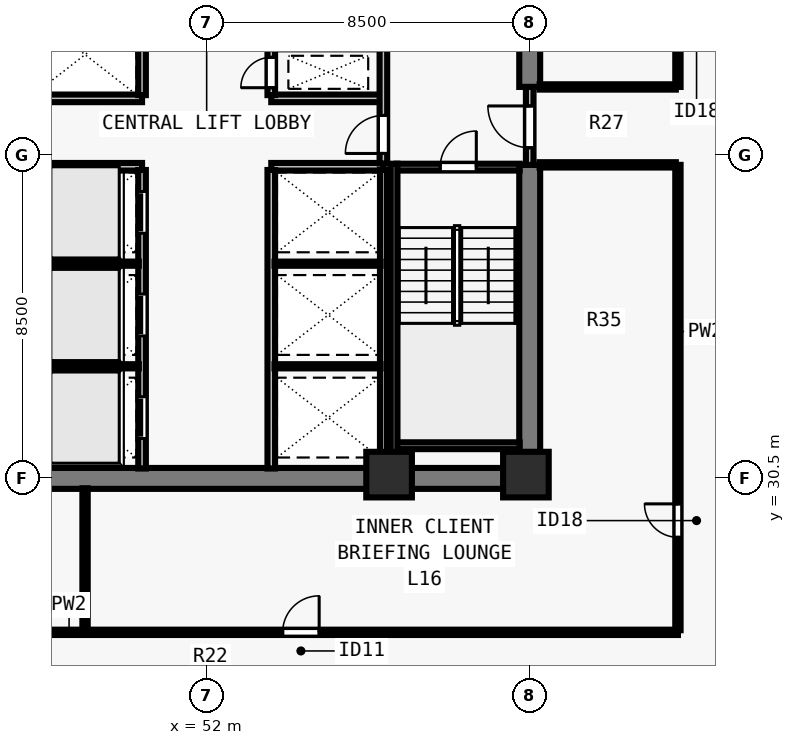
"""IFC4 building model, lengths in metres.
Left out: names, types, materials, properties, quantities, classifications, styles, units other than length and angle.
Written with IfcOpenShell. Run it as: python <this file> out.ifc"""

import sys

from ifc_helpers import new_model, si_unit, direction, frame, frame_2d, origin, origin_2d, place, context, subcontext, project, spatial, rectangle, extrude, element, fill, save


model = new_model("IFC4")
c1 = context("Model", 3, precision=1e-05, world=origin(), true_north=direction((0.0, 1.0)))
c2 = subcontext(c1, "Body", "Model", "MODEL_VIEW")
j1 = project(units=[si_unit("LENGTHUNIT", "METRE"), si_unit("PLANEANGLEUNIT", "RADIAN")], contexts=[c1])
p1 = place(None, origin())
s1 = spatial("IfcSite", under=j1, at=p1, CompositionType="ELEMENT")
p2 = place(p1, origin())
s2 = spatial("IfcBuilding", under=s1, at=p2, CompositionType="ELEMENT")
p3 = place(p2, frame((0.0, 0.0, 62.0)))
s3 = spatial("IfcBuildingStorey", under=s2, at=p3, CompositionType="ELEMENT", Elevation=62.0)
for number, where, z_axis, x_axis in (
    (1, (56.8, 30.6, 0.0), (0.0, 0.0, 1.0), (1.0, 0.0, 0.0)),
    (2, (60.4, 30.6, 0.0), (0.0, 0.0, 1.0), (1.0, 0.0, 0.0)),
):
    element("IfcColumn", number, at=place(p3, frame(where, z_axis=z_axis, x_axis=x_axis)), inside=s3, PredefinedType="COLUMN", context=c2, shape_type="SweptSolid", body=[
        extrude(rectangle(XDim=1.2, YDim=1.2, at=origin_2d()), origin(), (0.0, 0.0, 1.0), 3.5),
    ])
p4 = place(p3, frame((43.225, 30.5, 0.0), z_axis=(0.0, 0.0, 1.0), x_axis=(1.0, 0.0, 0.0)))
e3 = element("IfcWall", 3, at=p4, inside=s3, PredefinedType="SHEAR", context=c2, shape_type="SweptSolid", body=[
    extrude(rectangle(XDim=17.55, YDim=0.55, at=frame_2d((8.775, 0.0))), origin(), (0.0, 0.0, 1.0), 3.28),
])
p5 = place(p3, frame((60.5, 30.765, 0.0), z_axis=(0.0, 0.0, 1.0), x_axis=(0.0, 1.0, 0.0)))
e4 = element("IfcWall", 4, at=p5, inside=s3, PredefinedType="SHEAR", context=c2, shape_type="SweptSolid", body=[
    extrude(rectangle(XDim=7.985, YDim=0.55, at=frame_2d((3.993, 0.0))), origin(), (0.0, 0.0, 1.0), 3.28),
])
p6 = place(p3, frame((60.5, 40.8, 0.0), z_axis=(0.0, 0.0, 1.0), x_axis=(0.0, 1.0, 0.0)))
e5 = element("IfcWall", 5, at=p6, inside=s3, PredefinedType="SHEAR", context=c2, shape_type="SweptSolid", body=[
    extrude(rectangle(XDim=6.435, YDim=0.55, at=frame_2d((3.218, 0.0))), origin(), (0.0, 0.0, 1.0), 3.28),
])
for number, where, z_axis, x_axis in (
    (6, (47.35, 38.7, 0.0), (0.0, 0.0, 1.0), (1.0, 0.0, 0.0)),
    (7, (47.35, 40.5, 0.0), (0.0, 0.0, 1.0), (1.0, 0.0, 0.0)),
    (8, (53.7, 38.7, 0.0), (0.0, 0.0, 1.0), (1.0, 0.0, 0.0)),
    (9, (53.7, 40.5, 0.0), (0.0, 0.0, 1.0), (1.0, 0.0, 0.0)),
):
    element("IfcWall", number, at=place(p3, frame(where, z_axis=z_axis, x_axis=x_axis)), inside=s3, PredefinedType="SOLIDWALL", context=c2, shape_type="SweptSolid", body=[
        extrude(rectangle(XDim=2.95, YDim=0.2, at=frame_2d((1.475, 0.0))), origin(), (0.0, 0.0, 1.0), 3.28),
    ])
p7 = place(p3, frame((50.3, 30.76, 0.0), z_axis=(0.0, 0.0, 1.0), x_axis=(0.0, 1.0, 0.0)))
e10 = element("IfcWall", 10, at=p7, inside=s3, PredefinedType="SOLIDWALL", context=c2, shape_type="SweptSolid", body=[
    extrude(rectangle(XDim=7.855, YDim=0.2, at=frame_2d((3.927, 0.0))), origin(), (0.0, 0.0, 1.0), 3.28),
])
p8 = place(p7, frame((0.79, 0.0, 0.0)))
e11 = element("IfcOpeningElement", 11, at=p8, cuts=e10, PredefinedType="OPENING", context=c2, shape_type="SweptSolid", body=[
    extrude(rectangle(XDim=1.1, YDim=2.2, at=frame_2d((0.55, 1.1))), frame((0.0, 0.11, 0.0), z_axis=(0.0, -1.0, 0.0), x_axis=(1.0, 0.0, 0.0)), (0.0, 0.0, 1.0), 0.22),
])
p9 = place(p7, frame((3.49, 0.0, 0.0)))
e12 = element("IfcOpeningElement", 12, at=p9, cuts=e10, PredefinedType="OPENING", context=c2, shape_type="SweptSolid", body=[
    extrude(rectangle(XDim=1.1, YDim=2.2, at=frame_2d((0.55, 1.1))), frame((0.0, 0.11, 0.0), z_axis=(0.0, -1.0, 0.0), x_axis=(1.0, 0.0, 0.0)), (0.0, 0.0, 1.0), 0.22),
])
p10 = place(p7, frame((6.19, 0.0, 0.0)))
e13 = element("IfcOpeningElement", 13, at=p10, cuts=e10, PredefinedType="OPENING", context=c2, shape_type="SweptSolid", body=[
    extrude(rectangle(XDim=1.1, YDim=2.2, at=frame_2d((0.55, 1.1))), frame((0.0, 0.11, 0.0), z_axis=(0.0, -1.0, 0.0), x_axis=(1.0, 0.0, 0.0)), (0.0, 0.0, 1.0), 0.22),
])
p11 = place(p3, frame((53.7, 30.76, 0.0), z_axis=(0.0, 0.0, 1.0), x_axis=(0.0, 1.0, 0.0)))
e14 = element("IfcWall", 14, at=p11, inside=s3, PredefinedType="SOLIDWALL", context=c2, shape_type="SweptSolid", body=[
    extrude(rectangle(XDim=7.855, YDim=0.2, at=frame_2d((3.927, 0.0))), origin(), (0.0, 0.0, 1.0), 3.28),
])
p12 = place(p3, frame((50.3, 40.585, 0.0), z_axis=(0.0, 0.0, 1.0), x_axis=(0.0, 1.0, 0.0)))
e15 = element("IfcWall", 15, at=p12, inside=s3, PredefinedType="SOLIDWALL", context=c2, shape_type="SweptSolid", body=[
    extrude(rectangle(XDim=6.655, YDim=0.2, at=frame_2d((3.328, 0.0))), origin(), (0.0, 0.0, 1.0), 3.28),
])
p13 = place(p12, frame((5.065, 0.0, 0.0)))
e16 = element("IfcOpeningElement", 16, at=p13, cuts=e15, PredefinedType="OPENING", context=c2, shape_type="SweptSolid", body=[
    extrude(rectangle(XDim=0.8, YDim=2.08, at=frame_2d((0.4, 1.04))), frame((0.0, 0.11, 0.0), z_axis=(0.0, -1.0, 0.0), x_axis=(1.0, 0.0, 0.0)), (0.0, 0.0, 1.0), 0.22),
])
p14 = place(p3, frame((53.7, 40.585, 0.0), z_axis=(0.0, 0.0, 1.0), x_axis=(0.0, 1.0, 0.0)))
e17 = element("IfcWall", 17, at=p14, inside=s3, PredefinedType="SOLIDWALL", context=c2, shape_type="SweptSolid", body=[
    extrude(rectangle(XDim=6.655, YDim=0.2, at=frame_2d((3.328, 0.0))), origin(), (0.0, 0.0, 1.0), 3.28),
])
p15 = place(p14, frame((0.195, 0.0, 0.0)))
e18 = element("IfcOpeningElement", 18, at=p15, cuts=e17, PredefinedType="OPENING", context=c2, shape_type="SweptSolid", body=[
    extrude(rectangle(XDim=0.8, YDim=2.08, at=frame_2d((0.4, 1.04))), frame((0.0, 0.11, 0.0), z_axis=(0.0, -1.0, 0.0), x_axis=(1.0, 0.0, 0.0)), (0.0, 0.0, 1.0), 0.22),
])
p16 = place(p14, frame((4.265, 0.0, 0.0)))
e19 = element("IfcOpeningElement", 19, at=p16, cuts=e17, PredefinedType="OPENING", context=c2, shape_type="SweptSolid", body=[
    extrude(rectangle(XDim=0.95, YDim=2.12, at=frame_2d((0.475, 1.06))), frame((0.0, 0.11, 0.0), z_axis=(0.0, -1.0, 0.0), x_axis=(1.0, 0.0, 0.0)), (0.0, 0.0, 1.0), 0.22),
])
p17 = place(p3, frame((60.5, 38.75, 0.0), z_axis=(0.0, 0.0, 1.0), x_axis=(0.0, 1.0, 0.0)))
e20 = element("IfcWall", 20, at=p17, inside=s3, PredefinedType="SOLIDWALL", context=c2, shape_type="SweptSolid", body=[
    extrude(rectangle(XDim=2.05, YDim=0.2, at=frame_2d((1.025, 0.0))), origin(), (0.0, 0.0, 1.0), 3.28),
])
p18 = place(p17, frame((0.45, 0.0, 0.0)))
e21 = element("IfcOpeningElement", 21, at=p18, cuts=e20, PredefinedType="OPENING", context=c2, shape_type="SweptSolid", body=[
    extrude(rectangle(XDim=1.1, YDim=2.15, at=frame_2d((0.55, 1.075))), frame((0.0, 0.11, 0.0), z_axis=(0.0, -1.0, 0.0), x_axis=(1.0, 0.0, 0.0)), (0.0, 0.0, 1.0), 0.22),
])
p19 = place(p3, frame((56.65, 38.785, 0.0), z_axis=(0.0, 0.0, 1.0), x_axis=(0.0, 1.0, 0.0)))
e22 = element("IfcWall", 22, at=p19, inside=s3, PredefinedType="SOLIDWALL", context=c2, shape_type="SweptSolid", body=[
    extrude(rectangle(XDim=4.865, YDim=0.2, at=frame_2d((2.433, 0.0))), origin(), (0.0, 0.0, 1.0), 3.28),
])
p20 = place(p19, frame((0.265, 0.0, 0.0)))
e23 = element("IfcOpeningElement", 23, at=p20, cuts=e22, PredefinedType="OPENING", context=c2, shape_type="SweptSolid", body=[
    extrude(rectangle(XDim=1.0, YDim=2.15, at=frame_2d((0.5, 1.075))), frame((0.0, 0.11, 0.0), z_axis=(0.0, -1.0, 0.0), x_axis=(1.0, 0.0, 0.0)), (0.0, 0.0, 1.0), 0.22),
])
for number, where, z_axis, x_axis in (
    (24, (47.425, 33.45, 0.0), (0.0, 0.0, 1.0), (1.0, 0.0, 0.0)),
    (25, (47.425, 36.15, 0.0), (0.0, 0.0, 1.0), (1.0, 0.0, 0.0)),
):
    element("IfcWall", number, at=place(p3, frame(where, z_axis=z_axis, x_axis=x_axis)), inside=s3, PredefinedType="PARTITIONING", context=c2, shape_type="SweptSolid", body=[
        extrude(rectangle(XDim=2.79, YDim=0.11, at=frame_2d((1.395, 0.0))), origin(), (0.0, 0.0, 1.0), 3.28),
    ])
p21 = place(p3, frame((56.65, 30.76, 0.0), z_axis=(0.0, 0.0, 1.0), x_axis=(0.0, 1.0, 0.0)))
e26 = element("IfcWall", 26, at=p21, inside=s3, PredefinedType="SOLIDWALL", context=c2, shape_type="SweptSolid", body=[
    extrude(rectangle(XDim=7.855, YDim=0.18, at=frame_2d((3.927, 0.0))), origin(), (0.0, 0.0, 1.0), 3.28),
])
for number, where, z_axis, x_axis in (
    (27, (53.785, 33.45, 0.0), (0.0, 0.0, 1.0), (1.0, 0.0, 0.0)),
    (28, (53.785, 36.15, 0.0), (0.0, 0.0, 1.0), (1.0, 0.0, 0.0)),
):
    element("IfcWall", number, at=place(p3, frame(where, z_axis=z_axis, x_axis=x_axis)), inside=s3, PredefinedType="PARTITIONING", context=c2, shape_type="SweptSolid", body=[
        extrude(rectangle(XDim=2.79, YDim=0.11, at=frame_2d((1.395, 0.0))), origin(), (0.0, 0.0, 1.0), 3.28),
    ])
p22 = place(p3, frame((39.6, 26.45, 0.0), z_axis=(0.0, 0.0, 1.0), x_axis=(1.0, 0.0, 0.0)))
e29 = element("IfcWall", 29, at=p22, inside=s3, PredefinedType="PARTITIONING", context=c2, shape_type="SweptSolid", body=[
    extrude(rectangle(XDim=24.8, YDim=0.14, at=frame_2d((12.4, 0.0))), origin(), (0.0, 0.0, 1.0), 3.28),
])
p23 = place(p22, frame((2.2, 0.0, 0.0)))
e30 = element("IfcOpeningElement", 30, at=p23, cuts=e29, PredefinedType="OPENING", context=c2, shape_type="SweptSolid", body=[
    extrude(rectangle(XDim=0.96, YDim=2.12, at=frame_2d((0.48, 1.06))), frame((0.0, 0.08, 0.0), z_axis=(0.0, -1.0, 0.0), x_axis=(1.0, 0.0, 0.0)), (0.0, 0.0, 1.0), 0.16),
])
p24 = place(p22, frame((14.4, 0.0, 0.0)))
e31 = element("IfcOpeningElement", 31, at=p24, cuts=e29, PredefinedType="OPENING", context=c2, shape_type="SweptSolid", body=[
    extrude(rectangle(XDim=0.96, YDim=2.12, at=frame_2d((0.48, 1.06))), frame((0.0, 0.08, 0.0), z_axis=(0.0, -1.0, 0.0), x_axis=(1.0, 0.0, 0.0)), (0.0, 0.0, 1.0), 0.16),
])
p25 = place(p3, frame((64.4, 26.505, 0.0), z_axis=(0.0, 0.0, 1.0), x_axis=(0.0, 1.0, 0.0)))
e32 = element("IfcWall", 32, at=p25, inside=s3, PredefinedType="PARTITIONING", context=c2, shape_type="SweptSolid", body=[
    extrude(rectangle(XDim=12.245, YDim=0.14, at=frame_2d((6.123, 0.0))), origin(), (0.0, 0.0, 1.0), 3.28),
])
p26 = place(p25, frame((2.445, 0.0, 0.0)))
e33 = element("IfcOpeningElement", 33, at=p26, cuts=e32, PredefinedType="OPENING", context=c2, shape_type="SweptSolid", body=[
    extrude(rectangle(XDim=0.88, YDim=2.1, at=frame_2d((0.44, 1.05))), frame((0.0, 0.08, 0.0), z_axis=(0.0, -1.0, 0.0), x_axis=(1.0, 0.0, 0.0)), (0.0, 0.0, 1.0), 0.16),
])
p27 = place(p3, frame((64.4, 40.8, 0.0), z_axis=(0.0, 0.0, 1.0), x_axis=(0.0, 1.0, 0.0)))
e34 = element("IfcWall", 34, at=p27, inside=s3, PredefinedType="PARTITIONING", context=c2, shape_type="SweptSolid", body=[
    extrude(rectangle(XDim=10.695, YDim=0.14, at=frame_2d((5.348, 0.0))), origin(), (0.0, 0.0, 1.0), 3.28),
])
p28 = place(p27, frame((2.5, 0.0, 0.0)))
e35 = element("IfcOpeningElement", 35, at=p28, cuts=e34, PredefinedType="OPENING", context=c2, shape_type="SweptSolid", body=[
    extrude(rectangle(XDim=0.88, YDim=2.1, at=frame_2d((0.44, 1.05))), frame((0.0, 0.08, 0.0), z_axis=(0.0, -1.0, 0.0), x_axis=(1.0, 0.0, 0.0)), (0.0, 0.0, 1.0), 0.16),
])
for number, where, z_axis, x_axis in (
    (36, (60.76, 38.75, 0.0), (0.0, 0.0, 1.0), (1.0, 0.0, 0.0)),
    (37, (60.76, 40.8, 0.0), (0.0, 0.0, 1.0), (1.0, 0.0, 0.0)),
):
    element("IfcWall", number, at=place(p3, frame(where, z_axis=z_axis, x_axis=x_axis)), inside=s3, PredefinedType="PARTITIONING", context=c2, shape_type="SweptSolid", body=[
        extrude(rectangle(XDim=3.585, YDim=0.14, at=frame_2d((1.792, 0.0))), origin(), (0.0, 0.0, 1.0), 3.28),
    ])
p29 = place(p3, frame((48.8, 26.505, 0.0), z_axis=(0.0, 0.0, 1.0), x_axis=(0.0, 1.0, 0.0)))
e38 = element("IfcWall", 38, at=p29, inside=s3, PredefinedType="PARTITIONING", context=c2, shape_type="SweptSolid", body=[
    extrude(rectangle(XDim=3.735, YDim=0.14, at=frame_2d((1.868, 0.0))), origin(), (0.0, 0.0, 1.0), 3.28),
])
p30 = place(p3, frame((57.005, 38.69, 0.0), z_axis=(0.0, 0.0, 1.0), x_axis=(1.0, 0.0, 0.0)))
e39 = element("IfcWall", 39, at=p30, inside=s3, PredefinedType="SOLIDWALL", context=c2, shape_type="SweptSolid", body=[
    extrude(rectangle(XDim=3.23, YDim=0.18, at=frame_2d((1.615, 0.0))), origin(), (0.0, 0.0, 1.0), 3.28),
])
p31 = place(p30, frame((1.14, 0.0, 0.0)))
e40 = element("IfcOpeningElement", 40, at=p31, cuts=e39, PredefinedType="OPENING", context=c2, shape_type="SweptSolid", body=[
    extrude(rectangle(XDim=0.95, YDim=2.15, at=frame_2d((0.475, 1.075))), frame((0.0, 0.1, 0.0), z_axis=(0.0, -1.0, 0.0), x_axis=(1.0, 0.0, 0.0)), (0.0, 0.0, 1.0), 0.2),
])
p32 = place(p3, frame((57.005, 31.36, 0.0), z_axis=(0.0, 0.0, 1.0), x_axis=(1.0, 0.0, 0.0)))
e41 = element("IfcWall", 41, at=p32, inside=s3, PredefinedType="SOLIDWALL", context=c2, shape_type="SweptSolid", body=[
    extrude(rectangle(XDim=3.23, YDim=0.18, at=frame_2d((1.615, 0.0))), origin(), (0.0, 0.0, 1.0), 3.28),
])
p33 = place(p3, frame((56.93, 38.78, 0.0), z_axis=(0.0, 0.0, 1.0), x_axis=(0.0, -1.0, 0.0)))
e42 = element("IfcWall", 42, at=p33, inside=s3, PredefinedType="SOLIDWALL", context=c2, shape_type="SweptSolid", body=[
    extrude(rectangle(XDim=8.017, YDim=0.18, at=frame_2d((4.009, 0.0))), origin(), (0.0, 0.0, 1.0), 3.28),
])
p34 = place(p18, origin())
e43 = element("IfcDoor", 43, at=p34, inside=s3, OperationType="SINGLE_SWING_RIGHT", PredefinedType="DOOR", context=c2, shape_type="SweptSolid", body=[
    extrude(rectangle(XDim=1.1, YDim=2.15, at=frame_2d((0.55, 1.075))), frame((0.0, 0.025, 0.0), z_axis=(0.0, -1.0, 0.0), x_axis=(1.0, 0.0, 0.0)), (0.0, 0.0, 1.0), 0.05),
])
fill(e21, e43)
p35 = place(p20, origin())
e44 = element("IfcDoor", 44, at=p35, inside=s3, OperationType="SINGLE_SWING_LEFT", PredefinedType="DOOR", context=c2, shape_type="SweptSolid", body=[
    extrude(rectangle(XDim=1.0, YDim=2.15, at=frame_2d((0.5, 1.075))), frame((0.0, 0.025, 0.0), z_axis=(0.0, -1.0, 0.0), x_axis=(1.0, 0.0, 0.0)), (0.0, 0.0, 1.0), 0.05),
])
fill(e23, e44)
p36 = place(p8, origin())
e45 = element("IfcDoor", 45, at=p36, inside=s3, OperationType="SLIDING_TO_LEFT", PredefinedType="DOOR", context=c2, shape_type="SweptSolid", body=[
    extrude(rectangle(XDim=1.1, YDim=2.2, at=frame_2d((0.55, 1.1))), frame((0.0, 0.025, 0.0), z_axis=(0.0, -1.0, 0.0), x_axis=(1.0, 0.0, 0.0)), (0.0, 0.0, 1.0), 0.05),
])
fill(e11, e45)
p37 = place(p9, origin())
e46 = element("IfcDoor", 46, at=p37, inside=s3, OperationType="SLIDING_TO_LEFT", PredefinedType="DOOR", context=c2, shape_type="SweptSolid", body=[
    extrude(rectangle(XDim=1.1, YDim=2.2, at=frame_2d((0.55, 1.1))), frame((0.0, 0.025, 0.0), z_axis=(0.0, -1.0, 0.0), x_axis=(1.0, 0.0, 0.0)), (0.0, 0.0, 1.0), 0.05),
])
fill(e12, e46)
p38 = place(p10, origin())
e47 = element("IfcDoor", 47, at=p38, inside=s3, OperationType="SLIDING_TO_LEFT", PredefinedType="DOOR", context=c2, shape_type="SweptSolid", body=[
    extrude(rectangle(XDim=1.1, YDim=2.2, at=frame_2d((0.55, 1.1))), frame((0.0, 0.025, 0.0), z_axis=(0.0, -1.0, 0.0), x_axis=(1.0, 0.0, 0.0)), (0.0, 0.0, 1.0), 0.05),
])
fill(e13, e47)
p39 = place(p15, origin())
e48 = element("IfcDoor", 48, at=p39, inside=s3, OperationType="SINGLE_SWING_LEFT", PredefinedType="DOOR", context=c2, shape_type="SweptSolid", body=[
    extrude(rectangle(XDim=0.8, YDim=2.08, at=frame_2d((0.4, 1.04))), frame((0.0, 0.025, 0.0), z_axis=(0.0, -1.0, 0.0), x_axis=(1.0, 0.0, 0.0)), (0.0, 0.0, 1.0), 0.05),
])
fill(e18, e48)
p40 = place(p24, origin())
e49 = element("IfcDoor", 49, at=p40, inside=s3, OperationType="SINGLE_SWING_RIGHT", PredefinedType="DOOR", context=c2, shape_type="SweptSolid", body=[
    extrude(rectangle(XDim=0.96, YDim=2.12, at=frame_2d((0.48, 1.06))), frame((0.0, 0.025, 0.0), z_axis=(0.0, -1.0, 0.0), x_axis=(1.0, 0.0, 0.0)), (0.0, 0.0, 1.0), 0.05),
])
fill(e31, e49)
p41 = place(p26, origin())
e50 = element("IfcDoor", 50, at=p41, inside=s3, OperationType="SINGLE_SWING_RIGHT", PredefinedType="DOOR", context=c2, shape_type="SweptSolid", body=[
    extrude(rectangle(XDim=0.88, YDim=2.1, at=frame_2d((0.44, 1.05))), frame((0.0, 0.025, 0.0), z_axis=(0.0, -1.0, 0.0), x_axis=(1.0, 0.0, 0.0)), (0.0, 0.0, 1.0), 0.05),
])
fill(e33, e50)
p42 = place(p31, origin())
e51 = element("IfcDoor", 51, at=p42, inside=s3, OperationType="SINGLE_SWING_RIGHT", PredefinedType="DOOR", context=c2, shape_type="SweptSolid", body=[
    extrude(rectangle(XDim=0.95, YDim=2.15, at=frame_2d((0.475, 1.075))), frame((0.0, 0.025, 0.0), z_axis=(0.0, -1.0, 0.0), x_axis=(1.0, 0.0, 0.0)), (0.0, 0.0, 1.0), 0.05),
])
fill(e40, e51)
save(model, sys.argv[1])
